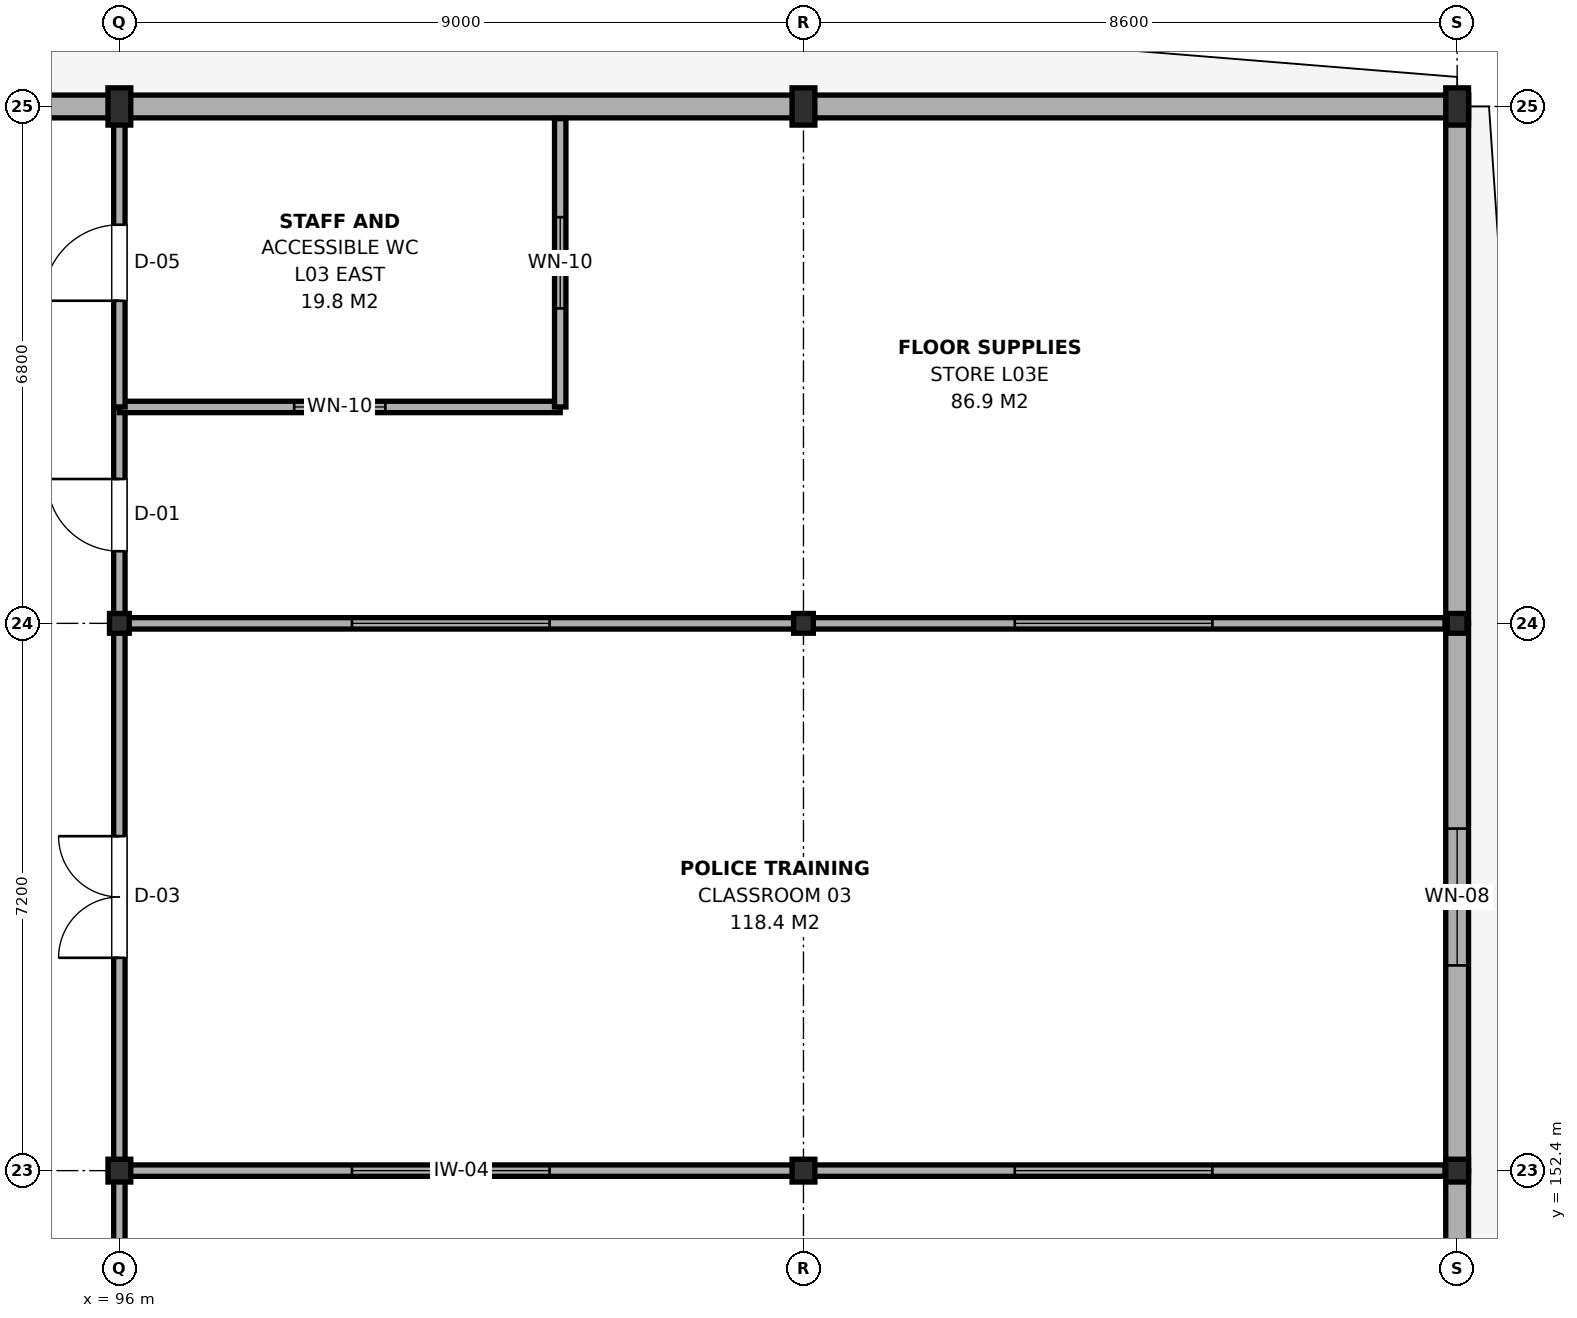
"""IFC4 building model, lengths in metres.
Left out: names, types, materials, properties, quantities, classifications, styles, units other than length and angle.
Written with IfcOpenShell. Run it as: python <this file> out.ifc"""

import sys

from ifc_helpers import new_model, si_unit, direction, frame, frame_2d, origin, origin_2d, place, context, subcontext, project, spatial, rectangle, i_section, extrude, element, fill, save


model = new_model("IFC4")
c1 = context("Model", 3, precision=1e-05, world=origin(), true_north=direction((0.0, 1.0)))
c2 = subcontext(c1, "Body", "Model", "MODEL_VIEW")
j1 = project(units=[si_unit("LENGTHUNIT", "METRE"), si_unit("PLANEANGLEUNIT", "RADIAN")], contexts=[c1])
p1 = place(None, origin())
s1 = spatial("IfcSite", under=j1, at=p1, CompositionType="ELEMENT")
p2 = place(p1, origin())
s2 = spatial("IfcBuilding", under=s1, at=p2, CompositionType="ELEMENT")
p3 = place(p2, frame((0.0, 0.0, 13.2)))
s3 = spatial("IfcBuildingStorey", under=s2, at=p3, CompositionType="ELEMENT", Elevation=13.2)
p4 = place(p3, frame((96.0, 152.4, 0.0), z_axis=(0.0, 0.0, 1.0), x_axis=(1.0, 0.0, 0.0)))
e1 = element("IfcColumn", 1, at=p4, inside=s3, PredefinedType="COLUMN", context=c2, shape_type="SweptSolid", body=[
    extrude(i_section(OverallWidth=0.3, OverallDepth=0.3, WebThickness=0.011, FlangeThickness=0.019, FilletRadius=0.027, at=origin_2d()), origin(), (0.0, 0.0, 1.0), 3.9),
])
p5 = place(p3, frame((96.0, 159.6, 0.0), z_axis=(0.0, 0.0, 1.0), x_axis=(1.0, 0.0, 0.0)))
e2 = element("IfcColumn", 2, at=p5, inside=s3, PredefinedType="COLUMN", context=c2, shape_type="SweptSolid", body=[
    extrude(i_section(OverallWidth=0.26, OverallDepth=0.26, WebThickness=0.01, FlangeThickness=0.018, FilletRadius=0.024, at=origin_2d()), origin(), (0.0, 0.0, 1.0), 3.9),
])
p6 = place(p3, frame((96.0, 166.4, 0.0), z_axis=(0.0, 0.0, 1.0), x_axis=(1.0, 0.0, 0.0)))
e3 = element("IfcColumn", 3, at=p6, inside=s3, PredefinedType="COLUMN", context=c2, shape_type="SweptSolid", body=[
    extrude(i_section(OverallWidth=0.3, OverallDepth=0.49, WebThickness=0.012, FlangeThickness=0.023, FilletRadius=0.027, at=origin_2d()), origin(), (0.0, 0.0, 1.0), 3.9),
])
p7 = place(p3, frame((105.0, 152.4, 0.0), z_axis=(0.0, 0.0, 1.0), x_axis=(1.0, 0.0, 0.0)))
e4 = element("IfcColumn", 4, at=p7, inside=s3, PredefinedType="COLUMN", context=c2, shape_type="SweptSolid", body=[
    extrude(i_section(OverallWidth=0.3, OverallDepth=0.3, WebThickness=0.011, FlangeThickness=0.019, FilletRadius=0.027, at=origin_2d()), origin(), (0.0, 0.0, 1.0), 3.9),
])
p8 = place(p3, frame((105.0, 159.6, 0.0), z_axis=(0.0, 0.0, 1.0), x_axis=(1.0, 0.0, 0.0)))
e5 = element("IfcColumn", 5, at=p8, inside=s3, PredefinedType="COLUMN", context=c2, shape_type="SweptSolid", body=[
    extrude(i_section(OverallWidth=0.26, OverallDepth=0.26, WebThickness=0.01, FlangeThickness=0.018, FilletRadius=0.024, at=origin_2d()), origin(), (0.0, 0.0, 1.0), 3.9),
])
p9 = place(p3, frame((105.0, 166.4, 0.0), z_axis=(0.0, 0.0, 1.0), x_axis=(1.0, 0.0, 0.0)))
e6 = element("IfcColumn", 6, at=p9, inside=s3, PredefinedType="COLUMN", context=c2, shape_type="SweptSolid", body=[
    extrude(i_section(OverallWidth=0.3, OverallDepth=0.49, WebThickness=0.012, FlangeThickness=0.023, FilletRadius=0.027, at=origin_2d()), origin(), (0.0, 0.0, 1.0), 3.9),
])
p10 = place(p3, frame((113.6, 152.4, 0.0), z_axis=(0.0, 0.0, 1.0), x_axis=(1.0, 0.0, 0.0)))
e7 = element("IfcColumn", 7, at=p10, inside=s3, PredefinedType="COLUMN", context=c2, shape_type="SweptSolid", body=[
    extrude(i_section(OverallWidth=0.3, OverallDepth=0.3, WebThickness=0.011, FlangeThickness=0.019, FilletRadius=0.027, at=origin_2d()), origin(), (0.0, 0.0, 1.0), 3.9),
])
p11 = place(p3, frame((113.6, 159.6, 0.0), z_axis=(0.0, 0.0, 1.0), x_axis=(1.0, 0.0, 0.0)))
e8 = element("IfcColumn", 8, at=p11, inside=s3, PredefinedType="COLUMN", context=c2, shape_type="SweptSolid", body=[
    extrude(i_section(OverallWidth=0.26, OverallDepth=0.26, WebThickness=0.01, FlangeThickness=0.018, FilletRadius=0.024, at=origin_2d()), origin(), (0.0, 0.0, 1.0), 3.9),
])
p12 = place(p3, frame((113.6, 166.4, 0.0), z_axis=(0.0, 0.0, 1.0), x_axis=(1.0, 0.0, 0.0)))
e9 = element("IfcColumn", 9, at=p12, inside=s3, PredefinedType="COLUMN", context=c2, shape_type="SweptSolid", body=[
    extrude(i_section(OverallWidth=0.3, OverallDepth=0.49, WebThickness=0.012, FlangeThickness=0.023, FilletRadius=0.027, at=origin_2d()), origin(), (0.0, 0.0, 1.0), 3.9),
])
p13 = place(p3, frame((113.6, 145.2, 0.0), z_axis=(0.0, 0.0, 1.0), x_axis=(0.0, 1.0, 0.0)))
e10 = element("IfcWall", 10, at=p13, inside=s3, PredefinedType="SOLIDWALL", context=c2, shape_type="SweptSolid", body=[
    extrude(rectangle(XDim=7.2, YDim=0.3, at=frame_2d((3.6, 0.0))), origin(), (0.0, 0.0, 1.0), 3.145),
])
p14 = place(p13, frame((2.7, 0.0, 0.65)))
e11 = element("IfcOpeningElement", 11, at=p14, cuts=e10, PredefinedType="OPENING", context=c2, shape_type="SweptSolid", body=[
    extrude(rectangle(XDim=1.8, YDim=1.2, at=frame_2d((0.9, 0.6))), frame((0.0, 0.165, 0.0), z_axis=(0.0, -1.0, 0.0), x_axis=(1.0, 0.0, 0.0)), (0.0, 0.0, 1.0), 0.33),
])
p15 = place(p3, frame((113.6, 152.4, 0.0), z_axis=(0.0, 0.0, 1.0), x_axis=(0.0, 1.0, 0.0)))
e12 = element("IfcWall", 12, at=p15, inside=s3, PredefinedType="SOLIDWALL", context=c2, shape_type="SweptSolid", body=[
    extrude(rectangle(XDim=7.2, YDim=0.3, at=frame_2d((3.6, 0.0))), origin(), (0.0, 0.0, 1.0), 3.195),
])
p16 = place(p15, frame((2.7, 0.0, 0.65)))
e13 = element("IfcOpeningElement", 13, at=p16, cuts=e12, PredefinedType="OPENING", context=c2, shape_type="SweptSolid", body=[
    extrude(rectangle(XDim=1.8, YDim=1.2, at=frame_2d((0.9, 0.6))), frame((0.0, 0.165, 0.0), z_axis=(0.0, -1.0, 0.0), x_axis=(1.0, 0.0, 0.0)), (0.0, 0.0, 1.0), 0.33),
])
p17 = place(p3, frame((113.6, 159.6, 0.0), z_axis=(0.0, 0.0, 1.0), x_axis=(0.0, 1.0, 0.0)))
e14 = element("IfcWall", 14, at=p17, inside=s3, PredefinedType="SOLIDWALL", context=c2, shape_type="SweptSolid", body=[
    extrude(rectangle(XDim=6.95, YDim=0.3, at=frame_2d((3.475, 0.0))), origin(), (0.0, 0.0, 1.0), 3.245),
])
p18 = place(p3, frame((87.0, 166.4, 0.0), z_axis=(0.0, 0.0, 1.0), x_axis=(1.0, 0.0, 0.0)))
e15 = element("IfcWall", 15, at=p18, inside=s3, PredefinedType="SOLIDWALL", context=c2, shape_type="SweptSolid", body=[
    extrude(rectangle(XDim=9.0, YDim=0.3, at=frame_2d((4.5, 0.0))), origin(), (0.0, 0.0, 1.0), 3.105),
])
p19 = place(p18, frame((1.52, 0.0, 0.65)))
e16 = element("IfcOpeningElement", 16, at=p19, cuts=e15, PredefinedType="OPENING", context=c2, shape_type="SweptSolid", body=[
    extrude(rectangle(XDim=2.0, YDim=1.8, at=frame_2d((1.0, 0.9))), frame((0.0, 0.165, 0.0), z_axis=(0.0, -1.0, 0.0), x_axis=(1.0, 0.0, 0.0)), (0.0, 0.0, 1.0), 0.33),
])
p20 = place(p18, frame((4.03, 0.0, 0.65)))
e17 = element("IfcOpeningElement", 17, at=p20, cuts=e15, PredefinedType="OPENING", context=c2, shape_type="SweptSolid", body=[
    extrude(rectangle(XDim=2.0, YDim=1.8, at=frame_2d((1.0, 0.9))), frame((0.0, 0.165, 0.0), z_axis=(0.0, -1.0, 0.0), x_axis=(1.0, 0.0, 0.0)), (0.0, 0.0, 1.0), 0.33),
])
p21 = place(p3, frame((96.0, 166.4, 0.0), z_axis=(0.0, 0.0, 1.0), x_axis=(1.0, 0.0, 0.0)))
e18 = element("IfcWall", 18, at=p21, inside=s3, PredefinedType="SOLIDWALL", context=c2, shape_type="SweptSolid", body=[
    extrude(rectangle(XDim=9.0, YDim=0.3, at=frame_2d((4.5, 0.0))), origin(), (0.0, 0.0, 1.0), 3.105),
])
p22 = place(p3, frame((105.0, 166.4, 0.0), z_axis=(0.0, 0.0, 1.0), x_axis=(1.0, 0.0, 0.0)))
e19 = element("IfcWall", 19, at=p22, inside=s3, PredefinedType="SOLIDWALL", context=c2, shape_type="SweptSolid", body=[
    extrude(rectangle(XDim=8.75, YDim=0.3, at=frame_2d((4.375, 0.0))), origin(), (0.0, 0.0, 1.0), 3.155),
])
p23 = place(p3, frame((96.0, 142.2, 0.0), z_axis=(0.0, 0.0, 1.0), x_axis=(0.0, 1.0, 0.0)))
e20 = element("IfcWall", 20, at=p23, inside=s3, PredefinedType="PARTITIONING", context=c2, shape_type="SweptSolid", body=[
    extrude(rectangle(XDim=10.2, YDim=0.15, at=frame_2d((5.1, 0.0))), origin(), (0.0, 0.0, 1.0), 3.105),
])
p24 = place(p23, frame((4.3, 0.0, 0.0)))
e21 = element("IfcOpeningElement", 21, at=p24, cuts=e20, PredefinedType="OPENING", context=c2, shape_type="SweptSolid", body=[
    extrude(rectangle(XDim=1.6, YDim=2.15, at=frame_2d((0.8, 1.075))), frame((0.0, 0.09, 0.0), z_axis=(0.0, -1.0, 0.0), x_axis=(1.0, 0.0, 0.0)), (0.0, 0.0, 1.0), 0.18),
])
p25 = place(p3, frame((96.0, 152.4, 0.0), z_axis=(0.0, 0.0, 1.0), x_axis=(0.0, 1.0, 0.0)))
e22 = element("IfcWall", 22, at=p25, inside=s3, PredefinedType="PARTITIONING", context=c2, shape_type="SweptSolid", body=[
    extrude(rectangle(XDim=7.2, YDim=0.15, at=frame_2d((3.6, 0.0))), origin(), (0.0, 0.0, 1.0), 3.195),
])
p26 = place(p25, frame((2.8, 0.0, 0.0)))
e23 = element("IfcOpeningElement", 23, at=p26, cuts=e22, PredefinedType="OPENING", context=c2, shape_type="SweptSolid", body=[
    extrude(rectangle(XDim=1.6, YDim=2.15, at=frame_2d((0.8, 1.075))), frame((0.0, 0.09, 0.0), z_axis=(0.0, -1.0, 0.0), x_axis=(1.0, 0.0, 0.0)), (0.0, 0.0, 1.0), 0.18),
])
p27 = place(p3, frame((96.0, 152.4, 0.0), z_axis=(0.0, 0.0, 1.0), x_axis=(1.0, 0.0, 0.0)))
e24 = element("IfcWall", 24, at=p27, inside=s3, PredefinedType="PARTITIONING", context=c2, shape_type="SweptSolid", body=[
    extrude(rectangle(XDim=17.44, YDim=0.15, at=frame_2d((8.72, 0.0))), origin(), (0.0, 0.0, 1.0), 3.105),
])
p28 = place(p27, frame((3.06, 0.0, 0.95)))
e25 = element("IfcOpeningElement", 25, at=p28, cuts=e24, PredefinedType="OPENING", context=c2, shape_type="SweptSolid", body=[
    extrude(rectangle(XDim=2.6, YDim=1.5, at=frame_2d((1.3, 0.75))), frame((0.0, 0.09, 0.0), z_axis=(0.0, -1.0, 0.0), x_axis=(1.0, 0.0, 0.0)), (0.0, 0.0, 1.0), 0.18),
])
p29 = place(p27, frame((11.78, 0.0, 0.95)))
e26 = element("IfcOpeningElement", 26, at=p29, cuts=e24, PredefinedType="OPENING", context=c2, shape_type="SweptSolid", body=[
    extrude(rectangle(XDim=2.6, YDim=1.5, at=frame_2d((1.3, 0.75))), frame((0.0, 0.09, 0.0), z_axis=(0.0, -1.0, 0.0), x_axis=(1.0, 0.0, 0.0)), (0.0, 0.0, 1.0), 0.18),
])
p30 = place(p3, frame((96.0, 159.6, 0.0), z_axis=(0.0, 0.0, 1.0), x_axis=(0.0, 1.0, 0.0)))
e27 = element("IfcWall", 27, at=p30, inside=s3, PredefinedType="PARTITIONING", context=c2, shape_type="SweptSolid", body=[
    extrude(rectangle(XDim=2.847, YDim=0.15, at=frame_2d((1.423, 0.0))), origin(), (0.0, 0.0, 1.0), 3.205),
])
p31 = place(p30, frame((0.949, 0.0, 0.0)))
e28 = element("IfcOpeningElement", 28, at=p31, cuts=e27, PredefinedType="OPENING", context=c2, shape_type="SweptSolid", body=[
    extrude(rectangle(XDim=0.95, YDim=2.15, at=frame_2d((0.475, 1.075))), frame((0.0, 0.09, 0.0), z_axis=(0.0, -1.0, 0.0), x_axis=(1.0, 0.0, 0.0)), (0.0, 0.0, 1.0), 0.18),
])
p32 = place(p3, frame((96.0, 162.447, 0.0), z_axis=(0.0, 0.0, 1.0), x_axis=(1.0, 0.0, 0.0)))
e29 = element("IfcWall", 29, at=p32, inside=s3, PredefinedType="PARTITIONING", context=c2, shape_type="SweptSolid", body=[
    extrude(rectangle(XDim=5.8, YDim=0.15, at=frame_2d((2.9, 0.0))), origin(), (0.0, 0.0, 1.0), 3.345),
])
p33 = place(p32, frame((2.3, 0.0, 0.95)))
e30 = element("IfcOpeningElement", 30, at=p33, cuts=e29, PredefinedType="OPENING", context=c2, shape_type="SweptSolid", body=[
    extrude(rectangle(XDim=1.2, YDim=1.5, at=frame_2d((0.6, 0.75))), frame((0.0, 0.09, 0.0), z_axis=(0.0, -1.0, 0.0), x_axis=(1.0, 0.0, 0.0)), (0.0, 0.0, 1.0), 0.18),
])
p34 = place(p3, frame((101.8, 162.447, 0.0), z_axis=(0.0, 0.0, 1.0), x_axis=(0.0, 1.0, 0.0)))
e31 = element("IfcWall", 31, at=p34, inside=s3, PredefinedType="PARTITIONING", context=c2, shape_type="SweptSolid", body=[
    extrude(rectangle(XDim=3.793, YDim=0.15, at=frame_2d((1.896, 0.0))), origin(), (0.0, 0.0, 1.0), 3.155),
])
p35 = place(p34, frame((1.296, 0.0, 0.95)))
e32 = element("IfcOpeningElement", 32, at=p35, cuts=e31, PredefinedType="OPENING", context=c2, shape_type="SweptSolid", body=[
    extrude(rectangle(XDim=1.2, YDim=1.5, at=frame_2d((0.6, 0.75))), frame((0.0, 0.09, 0.0), z_axis=(0.0, -1.0, 0.0), x_axis=(1.0, 0.0, 0.0)), (0.0, 0.0, 1.0), 0.18),
])
p36 = place(p3, frame((96.0, 162.447, 0.0), z_axis=(0.0, 0.0, 1.0), x_axis=(0.0, 1.0, 0.0)))
e33 = element("IfcWall", 33, at=p36, inside=s3, PredefinedType="PARTITIONING", context=c2, shape_type="SweptSolid", body=[
    extrude(rectangle(XDim=3.793, YDim=0.15, at=frame_2d((1.896, 0.0))), origin(), (0.0, 0.0, 1.0), 3.105),
])
p37 = place(p36, frame((1.397, 0.0, 0.0)))
e34 = element("IfcOpeningElement", 34, at=p37, cuts=e33, PredefinedType="OPENING", context=c2, shape_type="SweptSolid", body=[
    extrude(rectangle(XDim=1.0, YDim=2.15, at=frame_2d((0.5, 1.075))), frame((0.0, 0.09, 0.0), z_axis=(0.0, -1.0, 0.0), x_axis=(1.0, 0.0, 0.0)), (0.0, 0.0, 1.0), 0.18),
])
p38 = place(p3, frame((96.0, 159.6, 0.0), z_axis=(0.0, 0.0, 1.0), x_axis=(1.0, 0.0, 0.0)))
e35 = element("IfcWall", 35, at=p38, inside=s3, PredefinedType="PARTITIONING", context=c2, shape_type="SweptSolid", body=[
    extrude(rectangle(XDim=17.44, YDim=0.15, at=frame_2d((8.72, 0.0))), origin(), (0.0, 0.0, 1.0), 3.205),
])
p39 = place(p38, frame((3.06, 0.0, 0.95)))
e36 = element("IfcOpeningElement", 36, at=p39, cuts=e35, PredefinedType="OPENING", context=c2, shape_type="SweptSolid", body=[
    extrude(rectangle(XDim=2.6, YDim=1.5, at=frame_2d((1.3, 0.75))), frame((0.0, 0.09, 0.0), z_axis=(0.0, -1.0, 0.0), x_axis=(1.0, 0.0, 0.0)), (0.0, 0.0, 1.0), 0.18),
])
p40 = place(p38, frame((11.78, 0.0, 0.95)))
e37 = element("IfcOpeningElement", 37, at=p40, cuts=e35, PredefinedType="OPENING", context=c2, shape_type="SweptSolid", body=[
    extrude(rectangle(XDim=2.6, YDim=1.5, at=frame_2d((1.3, 0.75))), frame((0.0, 0.09, 0.0), z_axis=(0.0, -1.0, 0.0), x_axis=(1.0, 0.0, 0.0)), (0.0, 0.0, 1.0), 0.18),
])
p41 = place(p16, origin())
e38 = element("IfcWindow", 38, at=p41, inside=s3, PartitioningType="SINGLE_PANEL", PredefinedType="WINDOW", context=c2, shape_type="SweptSolid", body=[
    extrude(rectangle(XDim=1.8, YDim=1.2, at=frame_2d((0.9, 0.6))), frame((0.0, 0.03, 0.0), z_axis=(0.0, -1.0, 0.0), x_axis=(1.0, 0.0, 0.0)), (0.0, 0.0, 1.0), 0.06),
])
fill(e13, e38)
p42 = place(p26, origin())
e39 = element("IfcDoor", 39, at=p42, inside=s3, OperationType="DOUBLE_DOOR_SINGLE_SWING", PredefinedType="DOOR", context=c2, shape_type="SweptSolid", body=[
    extrude(rectangle(XDim=1.6, YDim=2.15, at=frame_2d((0.8, 1.075))), frame((0.0, 0.025, 0.0), z_axis=(0.0, -1.0, 0.0), x_axis=(1.0, 0.0, 0.0)), (0.0, 0.0, 1.0), 0.05),
])
fill(e23, e39)
p43 = place(p28, origin())
e40 = element("IfcWindow", 40, at=p43, inside=s3, PartitioningType="SINGLE_PANEL", PredefinedType="WINDOW", context=c2, shape_type="SweptSolid", body=[
    extrude(rectangle(XDim=2.6, YDim=1.5, at=frame_2d((1.3, 0.75))), frame((0.0, 0.03, 0.0), z_axis=(0.0, -1.0, 0.0), x_axis=(1.0, 0.0, 0.0)), (0.0, 0.0, 1.0), 0.06),
])
fill(e25, e40)
p44 = place(p29, origin())
e41 = element("IfcWindow", 41, at=p44, inside=s3, PartitioningType="SINGLE_PANEL", PredefinedType="WINDOW", context=c2, shape_type="SweptSolid", body=[
    extrude(rectangle(XDim=2.6, YDim=1.5, at=frame_2d((1.3, 0.75))), frame((0.0, 0.03, 0.0), z_axis=(0.0, -1.0, 0.0), x_axis=(1.0, 0.0, 0.0)), (0.0, 0.0, 1.0), 0.06),
])
fill(e26, e41)
p45 = place(p31, origin())
e42 = element("IfcDoor", 42, at=p45, inside=s3, OperationType="SINGLE_SWING_RIGHT", PredefinedType="DOOR", context=c2, shape_type="SweptSolid", body=[
    extrude(rectangle(XDim=0.95, YDim=2.15, at=frame_2d((0.475, 1.075))), frame((0.0, 0.025, 0.0), z_axis=(0.0, -1.0, 0.0), x_axis=(1.0, 0.0, 0.0)), (0.0, 0.0, 1.0), 0.05),
])
fill(e28, e42)
p46 = place(p33, origin())
e43 = element("IfcWindow", 43, at=p46, inside=s3, PartitioningType="SINGLE_PANEL", PredefinedType="WINDOW", context=c2, shape_type="SweptSolid", body=[
    extrude(rectangle(XDim=1.2, YDim=1.5, at=frame_2d((0.6, 0.75))), frame((0.0, 0.03, 0.0), z_axis=(0.0, -1.0, 0.0), x_axis=(1.0, 0.0, 0.0)), (0.0, 0.0, 1.0), 0.06),
])
fill(e30, e43)
p47 = place(p35, origin())
e44 = element("IfcWindow", 44, at=p47, inside=s3, PartitioningType="SINGLE_PANEL", PredefinedType="WINDOW", context=c2, shape_type="SweptSolid", body=[
    extrude(rectangle(XDim=1.2, YDim=1.5, at=frame_2d((0.6, 0.75))), frame((0.0, 0.03, 0.0), z_axis=(0.0, -1.0, 0.0), x_axis=(1.0, 0.0, 0.0)), (0.0, 0.0, 1.0), 0.06),
])
fill(e32, e44)
p48 = place(p37, origin())
e45 = element("IfcDoor", 45, at=p48, inside=s3, OperationType="SINGLE_SWING_LEFT", PredefinedType="DOOR", context=c2, shape_type="SweptSolid", body=[
    extrude(rectangle(XDim=1.0, YDim=2.15, at=frame_2d((0.5, 1.075))), frame((0.0, 0.025, 0.0), z_axis=(0.0, -1.0, 0.0), x_axis=(1.0, 0.0, 0.0)), (0.0, 0.0, 1.0), 0.05),
])
fill(e34, e45)
p49 = place(p39, origin())
e46 = element("IfcWindow", 46, at=p49, inside=s3, PartitioningType="SINGLE_PANEL", PredefinedType="WINDOW", context=c2, shape_type="SweptSolid", body=[
    extrude(rectangle(XDim=2.6, YDim=1.5, at=frame_2d((1.3, 0.75))), frame((0.0, 0.03, 0.0), z_axis=(0.0, -1.0, 0.0), x_axis=(1.0, 0.0, 0.0)), (0.0, 0.0, 1.0), 0.06),
])
fill(e36, e46)
p50 = place(p40, origin())
e47 = element("IfcWindow", 47, at=p50, inside=s3, PartitioningType="SINGLE_PANEL", PredefinedType="WINDOW", context=c2, shape_type="SweptSolid", body=[
    extrude(rectangle(XDim=2.6, YDim=1.5, at=frame_2d((1.3, 0.75))), frame((0.0, 0.03, 0.0), z_axis=(0.0, -1.0, 0.0), x_axis=(1.0, 0.0, 0.0)), (0.0, 0.0, 1.0), 0.06),
])
fill(e37, e47)
save(model, sys.argv[1])
